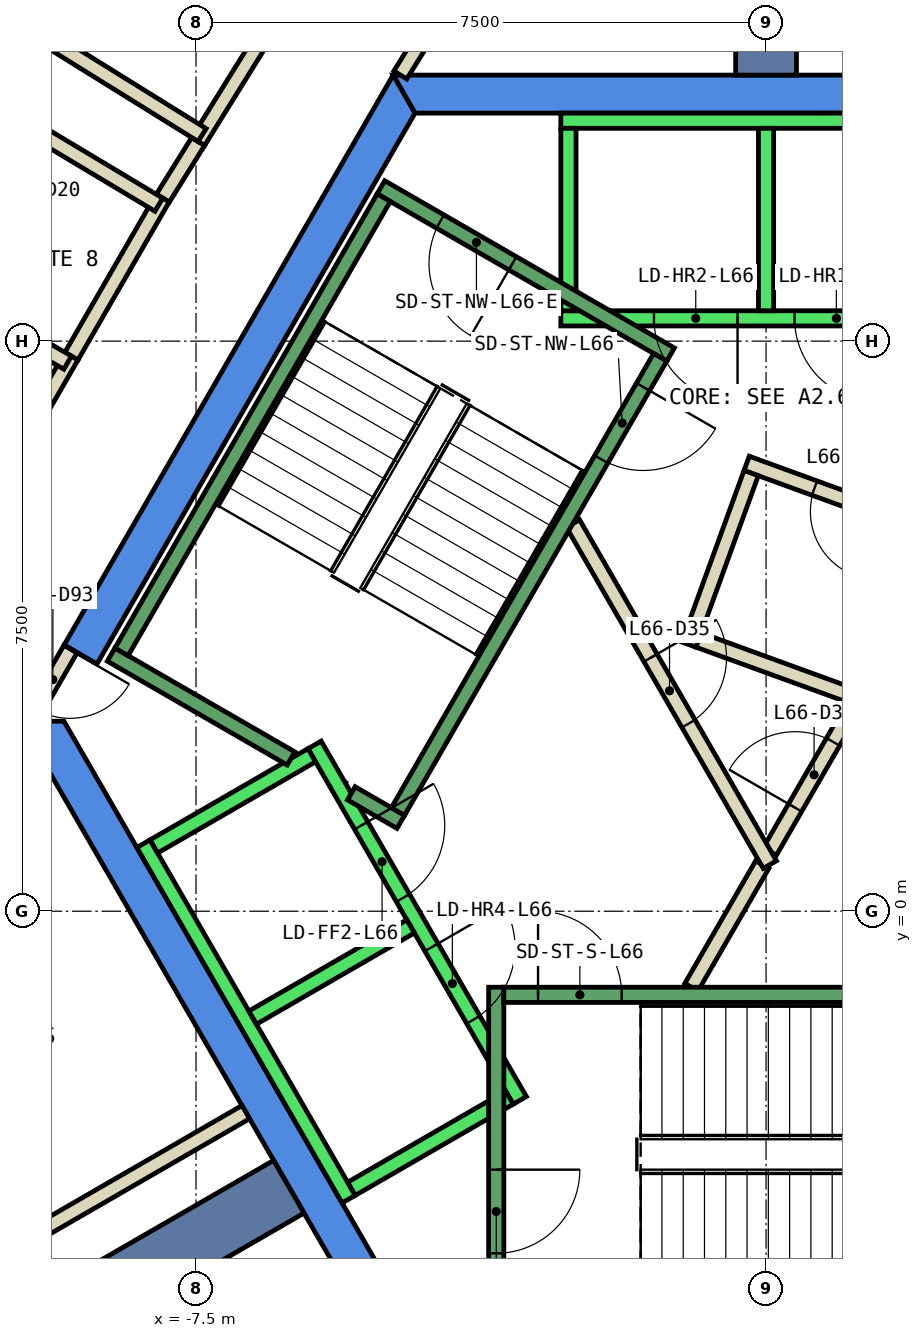
"""IFC4 building model, lengths in metres.
Left out: names, types, materials, properties, quantities, classifications, styles, units other than length and angle.
Written with IfcOpenShell. Run it as: python <this file> out.ifc"""

import sys

from ifc_helpers import new_model, si_unit, direction, frame, frame_2d, origin, place, context, subcontext, project, spatial, polyline, rectangle, outline, extrude, element, fill, save


model = new_model("IFC4")
c1 = context("Model", 3, precision=1e-05, world=origin(), true_north=direction((0.0, 1.0)))
c2 = subcontext(c1, "Body", "Model", "MODEL_VIEW")
j1 = project(units=[si_unit("LENGTHUNIT", "METRE"), si_unit("PLANEANGLEUNIT", "RADIAN")], contexts=[c1])
p1 = place(None, origin())
s1 = spatial("IfcSite", under=j1, at=p1, CompositionType="ELEMENT")
p2 = place(p1, origin())
s2 = spatial("IfcBuilding", under=s1, at=p2, CompositionType="ELEMENT")
p3 = place(p2, frame((0.0, 0.0, 286.4)))
s3 = spatial("IfcBuildingStorey", under=s2, at=p3, CompositionType="ELEMENT", Elevation=286.4)
p4 = place(p3, frame((0.0, 0.0, -0.6)))
e1 = element("IfcWall", 1, at=p4, inside=s3, PredefinedType="SHEAR", context=c2, shape_type="SweptSolid", body=[
    extrude(outline(polyline([(4.907, 11.0), (-4.907, 11.0), (-4.619, 10.5), (4.619, 10.5), (4.907, 11.0)])), origin(), (0.0, 0.0, 1.0), 3.86),
])
p5 = place(p3, frame((0.0, 0.0, -0.6)))
e2 = element("IfcWall", 2, at=p5, inside=s3, PredefinedType="SHEAR", context=c2, shape_type="SweptSolid", body=[
    extrude(outline(polyline([(-9.236, 3.502), (-8.803, 3.253), (-4.619, 10.5), (-4.907, 11.0), (-9.236, 3.502)])), origin(), (0.0, 0.0, 1.0), 3.86),
])
p6 = place(p3, frame((0.0, 0.0, -0.6)))
e3 = element("IfcWall", 3, at=p6, inside=s3, PredefinedType="SHEAR", context=c2, shape_type="SweptSolid", body=[
    extrude(outline(polyline([(-9.815, 2.5), (-4.907, -6.0), (-4.619, -5.5), (-9.238, 2.5), (-9.815, 2.5)])), origin(), (0.0, 0.0, 1.0), 3.86),
])
p7 = place(p3, frame((0.0, 11.0, -0.6), z_axis=(0.0, 0.0, 1.0), x_axis=(0.0, 1.0, 0.0)))
e4 = element("IfcWall", 4, at=p7, inside=s3, PredefinedType="SHEAR", context=c2, shape_type="SweptSolid", body=[
    extrude(rectangle(XDim=9.0, YDim=0.8, at=frame_2d((4.5, 0.0))), origin(), (0.0, 0.0, 1.0), 3.86),
])
p8 = place(p3, frame((-6.279, -3.625, -0.6), z_axis=(0.0, 0.0, 1.0), x_axis=(-0.866017533419, -0.500013631625, 0.0)))
e5 = element("IfcWall", 5, at=p8, inside=s3, PredefinedType="SHEAR", context=c2, shape_type="SweptSolid", body=[
    extrude(rectangle(XDim=9.0, YDim=0.8, at=frame_2d((4.5, 0.0))), origin(), (0.0, 0.0, 1.0), 3.86),
])
p9 = place(p3, frame((2.376, 4.934, 0.0), z_axis=(0.0, 0.0, 1.0), x_axis=(-0.939640574808, 0.342163104635, 0.0)))
e6 = element("IfcWall", 6, at=p9, inside=s3, PredefinedType="PARTITIONING", context=c2, shape_type="SweptSolid", body=[
    extrude(rectangle(XDim=2.8, YDim=0.2, at=frame_2d((1.4, 0.0))), origin(), (0.0, 0.0, 1.0), 3.26),
])
p10 = place(p9, frame((0.95, 0.0, 0.0)))
e7 = element("IfcOpeningElement", 7, at=p10, cuts=e6, PredefinedType="OPENING", context=c2, shape_type="SweptSolid", body=[
    extrude(rectangle(XDim=0.9, YDim=2.1, at=frame_2d((0.45, 1.05))), frame((0.0, 0.11, 0.0), z_axis=(0.0, -1.0, 0.0), x_axis=(1.0, 0.0, 0.0)), (0.0, 0.0, 1.0), 0.22),
])
p11 = place(p3, frame((-0.196, 5.764, 0.0), z_axis=(0.0, 0.0, 1.0), x_axis=(-0.34165322761, -0.939826086073, 0.0)))
e8 = element("IfcWall", 8, at=p11, inside=s3, PredefinedType="PARTITIONING", context=c2, shape_type="SweptSolid", body=[
    extrude(rectangle(XDim=2.4, YDim=0.2, at=frame_2d((1.2, 0.0))), origin(), (0.0, 0.0, 1.0), 3.26),
])
p12 = place(p3, frame((-0.888, 3.568, 0.0), z_axis=(0.0, 0.0, 1.0), x_axis=(0.939685034098, -0.34204098686, 0.0)))
e9 = element("IfcWall", 9, at=p12, inside=s3, PredefinedType="PARTITIONING", context=c2, shape_type="SweptSolid", body=[
    extrude(rectangle(XDim=2.237, YDim=0.2, at=frame_2d((1.119, 0.0))), origin(), (0.0, 0.0, 1.0), 3.26),
])
p13 = place(p3, frame((-4.478, 11.54, 0.0), z_axis=(0.0, 0.0, 1.0), x_axis=(-0.527362861778, -0.849640166198, 0.0)))
e10 = element("IfcWall", 10, at=p13, inside=s3, PredefinedType="PARTITIONING", context=c2, shape_type="SweptSolid", body=[
    extrude(rectangle(XDim=0.633, YDim=0.2, at=frame_2d((0.317, 0.0))), origin(), (0.0, 0.0, 1.0), 3.26),
])
p14 = place(p3, frame((-7.937, 9.38, 0.0), z_axis=(0.0, 0.0, 1.0), x_axis=(0.52850186976, 0.848932137252, 0.0)))
e11 = element("IfcWall", 11, at=p14, inside=s3, PredefinedType="PARTITIONING", context=c2, shape_type="SweptSolid", body=[
    extrude(rectangle(XDim=0.88, YDim=0.2, at=frame_2d((0.44, 0.0))), origin(), (0.0, 0.0, 1.0), 3.26),
])
p15 = place(p3, frame((-7.472, 10.127, 0.0), z_axis=(0.0, 0.0, 1.0), x_axis=(0.527707224705, 0.849426326996, 0.0)))
e12 = element("IfcWall", 12, at=p15, inside=s3, PredefinedType="PARTITIONING", context=c2, shape_type="SweptSolid", body=[
    extrude(rectangle(XDim=3.0, YDim=0.2, at=frame_2d((1.5, 0.0))), origin(), (0.0, 0.0, 1.0), 3.26),
])
p16 = place(p3, frame((-12.082, 2.207, 0.0), z_axis=(0.0, 0.0, 1.0), x_axis=(0.500123454404, 0.865954115618, 0.0)))
e13 = element("IfcWall", 13, at=p16, inside=s3, PredefinedType="PARTITIONING", context=c2, shape_type="SweptSolid", body=[
    extrude(rectangle(XDim=5.885, YDim=0.2, at=frame_2d((2.942, 0.0))), origin(), (0.0, 0.0, 1.0), 3.26),
])
p17 = place(p16, frame((2.493, 0.0, 0.0)))
e14 = element("IfcOpeningElement", 14, at=p17, cuts=e13, PredefinedType="OPENING", context=c2, shape_type="SweptSolid", body=[
    extrude(rectangle(XDim=1.0, YDim=2.1, at=frame_2d((0.5, 1.05))), frame((0.0, 0.11, 0.0), z_axis=(0.0, -1.0, 0.0), x_axis=(1.0, 0.0, 0.0)), (0.0, 0.0, 1.0), 0.22),
])
p18 = place(p3, frame((-9.139, 7.303, 0.0), z_axis=(0.0, 0.0, 1.0), x_axis=(0.499869187296, 0.866100915363, 0.0)))
e15 = element("IfcWall", 15, at=p18, inside=s3, PredefinedType="PARTITIONING", context=c2, shape_type="SweptSolid", body=[
    extrude(rectangle(XDim=2.401, YDim=0.2, at=frame_2d((1.2, 0.0))), origin(), (0.0, 0.0, 1.0), 3.26),
])
p19 = place(p3, frame((-0.982, -1.0, 0.0), z_axis=(0.0, 0.0, 1.0), x_axis=(0.50024047865, 0.865886518847, 0.0)))
e16 = element("IfcWall", 16, at=p19, inside=s3, PredefinedType="PARTITIONING", context=c2, shape_type="SweptSolid", body=[
    extrude(rectangle(XDim=1.863, YDim=0.2, at=frame_2d((0.931, 0.0))), origin(), (0.0, 0.0, 1.0), 3.26),
])
p20 = place(p3, frame((0.05, 0.787, 0.0), z_axis=(0.0, 0.0, 1.0), x_axis=(0.499945861543, 0.866056658381, 0.0)))
e17 = element("IfcWall", 17, at=p20, inside=s3, PredefinedType="PARTITIONING", context=c2, shape_type="SweptSolid", body=[
    extrude(rectangle(XDim=2.428, YDim=0.2, at=frame_2d((1.214, 0.0))), origin(), (0.0, 0.0, 1.0), 3.26),
])
p21 = place(p20, frame((0.664, 0.0, 0.0)))
e18 = element("IfcOpeningElement", 18, at=p21, cuts=e17, PredefinedType="OPENING", context=c2, shape_type="SweptSolid", body=[
    extrude(rectangle(XDim=1.0, YDim=2.1, at=frame_2d((0.5, 1.05))), frame((0.0, 0.11, 0.0), z_axis=(0.0, -1.0, 0.0), x_axis=(1.0, 0.0, 0.0)), (0.0, 0.0, 1.0), 0.22),
])
p22 = place(p3, frame((-2.54, 5.1, 0.0), z_axis=(0.0, 0.0, 1.0), x_axis=(0.499925051871, -0.866068670783, 0.0)))
e19 = element("IfcWall", 19, at=p22, inside=s3, PredefinedType="PARTITIONING", context=c2, shape_type="SweptSolid", body=[
    extrude(rectangle(XDim=5.181, YDim=0.2, at=frame_2d((2.59, 0.0))), origin(), (0.0, 0.0, 1.0), 3.26),
])
p23 = place(p22, frame((2.04, 0.0, 0.0)))
e20 = element("IfcOpeningElement", 20, at=p23, cuts=e19, PredefinedType="OPENING", context=c2, shape_type="SweptSolid", body=[
    extrude(rectangle(XDim=1.0, YDim=2.1, at=frame_2d((0.5, 1.05))), frame((0.0, 0.11, 0.0), z_axis=(0.0, -1.0, 0.0), x_axis=(1.0, 0.0, 0.0)), (0.0, 0.0, 1.0), 0.22),
])
p24 = place(p3, frame((-6.845, -2.643, 0.0), z_axis=(0.0, 0.0, 1.0), x_axis=(-0.865994457699, -0.500053596362, 0.0)))
e21 = element("IfcWall", 21, at=p24, inside=s3, PredefinedType="PARTITIONING", context=c2, shape_type="SweptSolid", body=[
    extrude(rectangle(XDim=6.701, YDim=0.2, at=frame_2d((3.351, 0.0))), origin(), (0.0, 0.0, 1.0), 3.26),
])
p25 = place(p3, frame((-9.543, 11.531, 0.0), z_axis=(0.0, 0.0, 1.0), x_axis=(0.849400119549, -0.527749407305, 0.0)))
e22 = element("IfcWall", 22, at=p25, inside=s3, PredefinedType="PARTITIONING", context=c2, shape_type="SweptSolid", body=[
    extrude(rectangle(XDim=2.5, YDim=0.2, at=frame_2d((1.25, 0.0))), origin(), (0.0, 0.0, 1.0), 3.26),
])
for number, where, z_axis, x_axis in (
    (23, (-7.989, 9.295, 0.0), (0.0, 0.0, 1.0), (-0.858, 0.514, 0.0)),
    (24, (-11.181, 8.367, 0.0), (0.0, 0.0, 1.0), (0.866, -0.5, 0.0)),
):
    element("IfcWall", number, at=place(p3, frame(where, z_axis=z_axis, x_axis=x_axis)), inside=s3, PredefinedType="PARTITIONING", context=c2, shape_type="SweptSolid", body=[
        extrude(rectangle(XDim=2.3, YDim=0.2, at=frame_2d((1.15, 0.0))), origin(), (0.0, 0.0, 1.0), 3.26),
    ])
p26 = place(p3, frame((-9.15, 3.452, 0.0), z_axis=(0.0, 0.0, 1.0), x_axis=(-0.500079945886, -0.865979242085, 0.0)))
e25 = element("IfcWall", 25, at=p26, inside=s3, PredefinedType="PARTITIONING", context=c2, shape_type="SweptSolid", body=[
    extrude(rectangle(XDim=0.926, YDim=0.2, at=frame_2d((0.463, 0.0))), origin(), (0.0, 0.0, 1.0), 2.4),
])
p27 = place(p26, frame((0.017, 0.0, 0.0)))
e26 = element("IfcOpeningElement", 26, at=p27, cuts=e25, PredefinedType="OPENING", context=c2, shape_type="SweptSolid", body=[
    extrude(rectangle(XDim=0.9, YDim=2.1, at=frame_2d((0.45, 1.05))), frame((0.0, 0.11, 0.0), z_axis=(0.0, -1.0, 0.0), x_axis=(1.0, 0.0, 0.0)), (0.0, 0.0, 1.0), 0.22),
])
p28 = place(p3, frame((2.7, 7.8, 0.0), z_axis=(0.0, 0.0, 1.0), x_axis=(-1.0, 0.0, 0.0)))
e27 = element("IfcWall", 27, at=p28, inside=s3, PredefinedType="STANDARD", context=c2, shape_type="SweptSolid", body=[
    extrude(rectangle(XDim=5.4, YDim=0.2, at=frame_2d((2.7, 0.0))), origin(), (0.0, 0.0, 1.0), 3.26),
])
p29 = place(p28, frame((1.225, 0.0, 0.0)))
e28 = element("IfcOpeningElement", 28, at=p29, cuts=e27, PredefinedType="OPENING", context=c2, shape_type="SweptSolid", body=[
    extrude(rectangle(XDim=1.1, YDim=2.1, at=frame_2d((0.55, 1.05))), frame((0.0, 0.11, 0.0), z_axis=(0.0, -1.0, 0.0), x_axis=(1.0, 0.0, 0.0)), (0.0, 0.0, 1.0), 0.22),
])
p30 = place(p28, frame((3.075, 0.0, 0.0)))
e29 = element("IfcOpeningElement", 29, at=p30, cuts=e27, PredefinedType="OPENING", context=c2, shape_type="SweptSolid", body=[
    extrude(rectangle(XDim=1.1, YDim=2.1, at=frame_2d((0.55, 1.05))), frame((0.0, 0.11, 0.0), z_axis=(0.0, -1.0, 0.0), x_axis=(1.0, 0.0, 0.0)), (0.0, 0.0, 1.0), 0.22),
])
p31 = place(p3, frame((2.7, 10.4, 0.0), z_axis=(0.0, 0.0, 1.0), x_axis=(-1.0, 0.0, 0.0)))
e30 = element("IfcWall", 30, at=p31, inside=s3, PredefinedType="STANDARD", context=c2, shape_type="SweptSolid", body=[
    extrude(rectangle(XDim=5.4, YDim=0.2, at=frame_2d((2.7, 0.0))), origin(), (0.0, 0.0, 1.0), 3.26),
])
for number, where, z_axis, x_axis in (
    (31, (0.0, 7.9, 0.0), (0.0, 0.0, 1.0), (0.0, 1.0, 0.0)),
    (32, (-2.6, 7.9, 0.0), (0.0, 0.0, 1.0), (0.0, 1.0, 0.0)),
):
    element("IfcWall", number, at=place(p3, frame(where, z_axis=z_axis, x_axis=x_axis)), inside=s3, PredefinedType="STANDARD", context=c2, shape_type="SweptSolid", body=[
        extrude(rectangle(XDim=2.4, YDim=0.2, at=frame_2d((1.2, 0.0))), origin(), (0.0, 0.0, 1.0), 3.26),
    ])
p32 = place(p3, frame((-5.94, 2.188, 0.0), z_axis=(0.0, 0.0, 1.0), x_axis=(0.500034260056, -0.866005622828, 0.0)))
e33 = element("IfcWall", 33, at=p32, inside=s3, PredefinedType="STANDARD", context=c2, shape_type="SweptSolid", body=[
    extrude(rectangle(XDim=5.399, YDim=0.2, at=frame_2d((2.7, 0.0))), origin(), (0.0, 0.0, 1.0), 3.26),
])
p33 = place(p32, frame((3.075, 0.0, 0.0)))
e34 = element("IfcOpeningElement", 34, at=p33, cuts=e33, PredefinedType="OPENING", context=c2, shape_type="SweptSolid", body=[
    extrude(rectangle(XDim=1.1, YDim=2.1, at=frame_2d((0.55, 1.05))), frame((0.0, 0.11, 0.0), z_axis=(0.0, -1.0, 0.0), x_axis=(1.0, 0.0, 0.0)), (0.0, 0.0, 1.0), 0.22),
])
p34 = place(p32, frame((1.225, 0.0, 0.0)))
e35 = element("IfcOpeningElement", 35, at=p34, cuts=e33, PredefinedType="OPENING", context=c2, shape_type="SweptSolid", body=[
    extrude(rectangle(XDim=1.1, YDim=2.1, at=frame_2d((0.55, 1.05))), frame((0.0, 0.11, 0.0), z_axis=(0.0, -1.0, 0.0), x_axis=(1.0, 0.0, 0.0)), (0.0, 0.0, 1.0), 0.22),
])
p35 = place(p3, frame((-8.192, 0.888, 0.0), z_axis=(0.0, 0.0, 1.0), x_axis=(0.500034260056, -0.866005622828, 0.0)))
e36 = element("IfcWall", 36, at=p35, inside=s3, PredefinedType="STANDARD", context=c2, shape_type="SweptSolid", body=[
    extrude(rectangle(XDim=5.399, YDim=0.2, at=frame_2d((2.7, 0.0))), origin(), (0.0, 0.0, 1.0), 3.26),
])
for number, where, z_axis, x_axis in (
    (37, (-5.977, 2.052, 0.0), (0.0, 0.0, 1.0), (-0.866, -0.5, 0.0)),
    (38, (-4.677, -0.2, 0.0), (0.0, 0.0, 1.0), (-0.866, -0.5, 0.0)),
):
    element("IfcWall", number, at=place(p3, frame(where, z_axis=z_axis, x_axis=x_axis)), inside=s3, PredefinedType="STANDARD", context=c2, shape_type="SweptSolid", body=[
        extrude(rectangle(XDim=2.399, YDim=0.2, at=frame_2d((1.2, 0.0))), origin(), (0.0, 0.0, 1.0), 3.26),
    ])
p36 = place(p3, frame((-3.377, -2.452, 0.0), z_axis=(0.0, 0.0, 1.0), x_axis=(-0.865955154139, -0.50012165622, 0.0)))
e39 = element("IfcWall", 39, at=p36, inside=s3, PredefinedType="STANDARD", context=c2, shape_type="SweptSolid", body=[
    extrude(rectangle(XDim=2.4, YDim=0.2, at=frame_2d((1.2, 0.0))), origin(), (0.0, 0.0, 1.0), 3.26),
])
p37 = place(p3, frame((-3.55, -1.0, 0.0), z_axis=(0.0, 0.0, 1.0), x_axis=(0.0, -1.0, 0.0)))
e40 = element("IfcWall", 40, at=p37, inside=s3, PredefinedType="STANDARD", context=c2, shape_type="SweptSolid", body=[
    extrude(rectangle(XDim=4.4, YDim=0.2, at=frame_2d((2.2, 0.0))), origin(), (0.0, 0.0, 1.0), 3.26),
])
p38 = place(p37, frame((2.4, 0.0, 0.0)))
e41 = element("IfcOpeningElement", 41, at=p38, cuts=e40, PredefinedType="OPENING", context=c2, shape_type="SweptSolid", body=[
    extrude(rectangle(XDim=1.1, YDim=2.2, at=frame_2d((0.55, 1.1))), frame((0.0, 0.11, 0.0), z_axis=(0.0, -1.0, 0.0), x_axis=(1.0, 0.0, 0.0)), (0.0, 0.0, 1.0), 0.22),
])
p39 = place(p3, frame((-3.45, -1.1, 0.0), z_axis=(0.0, 0.0, 1.0), x_axis=(1.0, 0.0, 0.0)))
e42 = element("IfcWall", 42, at=p39, inside=s3, PredefinedType="STANDARD", context=c2, shape_type="SweptSolid", body=[
    extrude(rectangle(XDim=6.9, YDim=0.2, at=frame_2d((3.45, 0.0))), origin(), (0.0, 0.0, 1.0), 3.26),
])
p40 = place(p39, frame((0.45, 0.0, 0.0)))
e43 = element("IfcOpeningElement", 43, at=p40, cuts=e42, PredefinedType="OPENING", context=c2, shape_type="SweptSolid", body=[
    extrude(rectangle(XDim=1.1, YDim=2.2, at=frame_2d((0.55, 1.1))), frame((0.0, 0.11, 0.0), z_axis=(0.0, -1.0, 0.0), x_axis=(1.0, 0.0, 0.0)), (0.0, 0.0, 1.0), 0.22),
])
p41 = place(p3, frame((-1.256, 7.324, 0.0), z_axis=(0.0, 0.0, 1.0), x_axis=(-0.866046073146, 0.499964197906, 0.0)))
e44 = element("IfcWall", 44, at=p41, inside=s3, PredefinedType="STANDARD", context=c2, shape_type="SweptSolid", body=[
    extrude(rectangle(XDim=4.4, YDim=0.2, at=frame_2d((2.2, 0.0))), origin(), (0.0, 0.0, 1.0), 3.26),
])
p42 = place(p41, frame((2.4, 0.0, 0.0)))
e45 = element("IfcOpeningElement", 45, at=p42, cuts=e44, PredefinedType="OPENING", context=c2, shape_type="SweptSolid", body=[
    extrude(rectangle(XDim=1.1, YDim=2.2, at=frame_2d((0.55, 1.1))), frame((0.0, 0.11, 0.0), z_axis=(0.0, -1.0, 0.0), x_axis=(1.0, 0.0, 0.0)), (0.0, 0.0, 1.0), 0.22),
])
p43 = place(p3, frame((-6.25, 2.01, 0.0), z_axis=(0.0, 0.0, 1.0), x_axis=(-0.86611865017, 0.499838457731, 0.0)))
e46 = element("IfcWall", 46, at=p43, inside=s3, PredefinedType="STANDARD", context=c2, shape_type="SweptSolid", body=[
    extrude(rectangle(XDim=2.733, YDim=0.2, at=frame_2d((1.366, 0.0))), origin(), (0.0, 0.0, 1.0), 3.26),
])
p44 = place(p3, frame((-4.806, 1.176, 0.0), z_axis=(0.0, 0.0, 1.0), x_axis=(-0.866558586415, 0.499075361355, 0.0)))
e47 = element("IfcWall", 47, at=p44, inside=s3, PredefinedType="STANDARD", context=c2, shape_type="SweptSolid", body=[
    extrude(rectangle(XDim=0.751, YDim=0.2, at=frame_2d((0.376, 0.0))), origin(), (0.0, 0.0, 1.0), 3.26),
])
p45 = place(p3, frame((-1.393, 7.288, 0.0), z_axis=(0.0, 0.0, 1.0), x_axis=(-0.499963383562, -0.866046543262, 0.0)))
e48 = element("IfcWall", 48, at=p45, inside=s3, PredefinedType="STANDARD", context=c2, shape_type="SweptSolid", body=[
    extrude(rectangle(XDim=6.9, YDim=0.2, at=frame_2d((3.45, 0.0))), origin(), (0.0, 0.0, 1.0), 3.26),
])
p46 = place(p45, frame((0.45, 0.0, 0.0)))
e49 = element("IfcOpeningElement", 49, at=p46, cuts=e48, PredefinedType="OPENING", context=c2, shape_type="SweptSolid", body=[
    extrude(rectangle(XDim=1.1, YDim=2.2, at=frame_2d((0.55, 1.1))), frame((0.0, 0.11, 0.0), z_axis=(0.0, -1.0, 0.0), x_axis=(1.0, 0.0, 0.0)), (0.0, 0.0, 1.0), 0.22),
])
p47 = place(p3, frame((-5.03, 9.388, 0.0), z_axis=(0.0, 0.0, 1.0), x_axis=(-0.499978703459, -0.866037698999, 0.0)))
e50 = element("IfcWall", 50, at=p47, inside=s3, PredefinedType="STANDARD", context=c2, shape_type="SweptSolid", body=[
    extrude(rectangle(XDim=6.9, YDim=0.2, at=frame_2d((3.45, 0.0))), origin(), (0.0, 0.0, 1.0), 3.26),
])
p48 = place(p21, origin())
e51 = element("IfcDoor", 51, at=p48, inside=s3, OperationType="SINGLE_SWING_RIGHT", PredefinedType="DOOR", context=c2, shape_type="SweptSolid", body=[
    extrude(rectangle(XDim=1.0, YDim=2.1, at=frame_2d((0.5, 1.05))), frame((0.0, 0.025, 0.0), z_axis=(0.0, -1.0, 0.0), x_axis=(1.0, 0.0, 0.0)), (0.0, 0.0, 1.0), 0.05),
])
fill(e18, e51)
p49 = place(p23, origin())
e52 = element("IfcDoor", 52, at=p49, inside=s3, OperationType="SINGLE_SWING_RIGHT", PredefinedType="DOOR", context=c2, shape_type="SweptSolid", body=[
    extrude(rectangle(XDim=1.0, YDim=2.1, at=frame_2d((0.5, 1.05))), frame((0.0, 0.025, 0.0), z_axis=(0.0, -1.0, 0.0), x_axis=(1.0, 0.0, 0.0)), (0.0, 0.0, 1.0), 0.05),
])
fill(e20, e52)
p50 = place(p10, origin())
e53 = element("IfcDoor", 53, at=p50, inside=s3, OperationType="SINGLE_SWING_LEFT", PredefinedType="DOOR", context=c2, shape_type="SweptSolid", body=[
    extrude(rectangle(XDim=0.9, YDim=2.1, at=frame_2d((0.45, 1.05))), frame((0.0, 0.025, 0.0), z_axis=(0.0, -1.0, 0.0), x_axis=(1.0, 0.0, 0.0)), (0.0, 0.0, 1.0), 0.05),
])
fill(e7, e53)
p51 = place(p27, origin())
e54 = element("IfcDoor", 54, at=p51, inside=s3, OperationType="SINGLE_SWING_LEFT", PredefinedType="DOOR", context=c2, shape_type="SweptSolid", body=[
    extrude(rectangle(XDim=0.9, YDim=2.1, at=frame_2d((0.45, 1.05))), frame((0.0, 0.025, 0.0), z_axis=(0.0, -1.0, 0.0), x_axis=(1.0, 0.0, 0.0)), (0.0, 0.0, 1.0), 0.05),
])
fill(e26, e54)
p52 = place(p29, origin())
e55 = element("IfcDoor", 55, at=p52, inside=s3, OperationType="SLIDING_TO_LEFT", PredefinedType="DOOR", context=c2, shape_type="SweptSolid", body=[
    extrude(rectangle(XDim=1.1, YDim=2.1, at=frame_2d((0.55, 1.05))), frame((0.0, 0.025, 0.0), z_axis=(0.0, -1.0, 0.0), x_axis=(1.0, 0.0, 0.0)), (0.0, 0.0, 1.0), 0.05),
])
fill(e28, e55)
p53 = place(p30, origin())
e56 = element("IfcDoor", 56, at=p53, inside=s3, OperationType="SLIDING_TO_LEFT", PredefinedType="DOOR", context=c2, shape_type="SweptSolid", body=[
    extrude(rectangle(XDim=1.1, YDim=2.1, at=frame_2d((0.55, 1.05))), frame((0.0, 0.025, 0.0), z_axis=(0.0, -1.0, 0.0), x_axis=(1.0, 0.0, 0.0)), (0.0, 0.0, 1.0), 0.05),
])
fill(e29, e56)
p54 = place(p33, origin())
e57 = element("IfcDoor", 57, at=p54, inside=s3, OperationType="SLIDING_TO_LEFT", PredefinedType="DOOR", context=c2, shape_type="SweptSolid", body=[
    extrude(rectangle(XDim=1.1, YDim=2.1, at=frame_2d((0.55, 1.05))), frame((0.0, 0.025, 0.0), z_axis=(0.0, -1.0, 0.0), x_axis=(1.0, 0.0, 0.0)), (0.0, 0.0, 1.0), 0.05),
])
fill(e34, e57)
p55 = place(p34, origin())
e58 = element("IfcDoor", 58, at=p55, inside=s3, OperationType="SLIDING_TO_LEFT", PredefinedType="DOOR", context=c2, shape_type="SweptSolid", body=[
    extrude(rectangle(XDim=1.1, YDim=2.1, at=frame_2d((0.55, 1.05))), frame((0.0, 0.025, 0.0), z_axis=(0.0, -1.0, 0.0), x_axis=(1.0, 0.0, 0.0)), (0.0, 0.0, 1.0), 0.05),
])
fill(e35, e58)
p56 = place(p40, origin())
e59 = element("IfcDoor", 59, at=p56, inside=s3, OperationType="SINGLE_SWING_LEFT", PredefinedType="DOOR", context=c2, shape_type="SweptSolid", body=[
    extrude(rectangle(XDim=1.1, YDim=2.2, at=frame_2d((0.55, 1.1))), frame((0.0, 0.025, 0.0), z_axis=(0.0, -1.0, 0.0), x_axis=(1.0, 0.0, 0.0)), (0.0, 0.0, 1.0), 0.05),
])
fill(e43, e59)
p57 = place(p38, origin())
e60 = element("IfcDoor", 60, at=p57, inside=s3, OperationType="SINGLE_SWING_LEFT", PredefinedType="DOOR", context=c2, shape_type="SweptSolid", body=[
    extrude(rectangle(XDim=1.1, YDim=2.2, at=frame_2d((0.55, 1.1))), frame((0.0, 0.025, 0.0), z_axis=(0.0, -1.0, 0.0), x_axis=(1.0, 0.0, 0.0)), (0.0, 0.0, 1.0), 0.05),
])
fill(e41, e60)
p58 = place(p46, origin())
e61 = element("IfcDoor", 61, at=p58, inside=s3, OperationType="SINGLE_SWING_LEFT", PredefinedType="DOOR", context=c2, shape_type="SweptSolid", body=[
    extrude(rectangle(XDim=1.1, YDim=2.2, at=frame_2d((0.55, 1.1))), frame((0.0, 0.025, 0.0), z_axis=(0.0, -1.0, 0.0), x_axis=(1.0, 0.0, 0.0)), (0.0, 0.0, 1.0), 0.05),
])
fill(e49, e61)
p59 = place(p42, origin())
e62 = element("IfcDoor", 62, at=p59, inside=s3, OperationType="SINGLE_SWING_LEFT", PredefinedType="DOOR", context=c2, shape_type="SweptSolid", body=[
    extrude(rectangle(XDim=1.1, YDim=2.2, at=frame_2d((0.55, 1.1))), frame((0.0, 0.025, 0.0), z_axis=(0.0, -1.0, 0.0), x_axis=(1.0, 0.0, 0.0)), (0.0, 0.0, 1.0), 0.05),
])
fill(e45, e62)
save(model, sys.argv[1])
